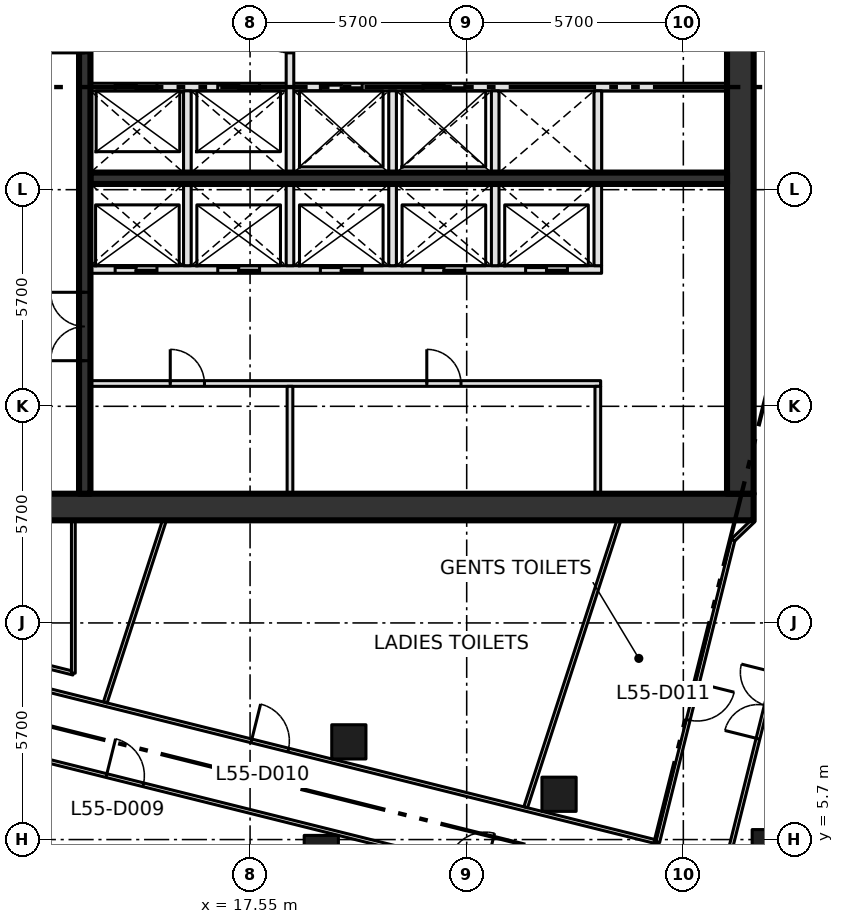
"""IFC4 building model, lengths in metres.
Left out: names, types, materials, properties, quantities, classifications, styles, units other than length and angle.
Written with IfcOpenShell. Run it as: python <this file> out.ifc"""

import sys

from ifc_helpers import new_model, si_unit, direction, frame, frame_2d, origin, origin_2d, place, context, subcontext, project, spatial, rectangle, extrude, element, fill, save


model = new_model("IFC4")
c1 = context("Model", 3, precision=1e-05, world=origin(), true_north=direction((0.0, 1.0)))
c2 = subcontext(c1, "Body", "Model", "MODEL_VIEW")
j1 = project(units=[si_unit("LENGTHUNIT", "METRE"), si_unit("PLANEANGLEUNIT", "RADIAN")], contexts=[c1])
p1 = place(None, origin())
s1 = spatial("IfcSite", under=j1, at=p1, CompositionType="ELEMENT")
p2 = place(p1, origin())
s2 = spatial("IfcBuilding", under=s1, at=p2, CompositionType="ELEMENT")
p3 = place(p2, frame((0.0, 0.0, 242.4)))
s3 = spatial("IfcBuildingStorey", under=s2, at=p3, CompositionType="ELEMENT", Elevation=242.4)
for number, where, z_axis, x_axis in (
    (1, (19.424, 5.36, 0.0), (0.0, 0.0, 1.0), (1.0, 0.0, 0.0)),
    (2, (20.149, 8.271, 0.0), (0.0, 0.0, 1.0), (1.0, 0.0, 0.0)),
    (3, (25.68, 6.892, 0.0), (0.0, 0.0, 1.0), (1.0, 0.0, 0.0)),
    (4, (31.211, 5.513, 0.0), (0.0, 0.0, 1.0), (1.0, 0.0, 0.0)),
):
    element("IfcColumn", number, at=place(p3, frame(where, z_axis=z_axis, x_axis=x_axis)), inside=s3, PredefinedType="COLUMN", context=c2, shape_type="SweptSolid", body=[
        extrude(rectangle(XDim=0.9, YDim=0.9, at=origin_2d()), origin(), (0.0, 0.0, 1.0), 4.2),
    ])
p4 = place(p3, frame((8.0, 14.45, -0.3), z_axis=(0.0, 0.0, 1.0), x_axis=(1.0, 0.0, 0.0)))
e5 = element("IfcWall", 5, at=p4, inside=s3, PredefinedType="SHEAR", context=c2, shape_type="SweptSolid", body=[
    extrude(rectangle(XDim=22.8, YDim=0.7, at=frame_2d((11.4, 0.0))), origin(), (0.0, 0.0, 1.0), 4.2),
])
p5 = place(p4, frame((2.3, 0.0, 0.3)))
e6 = element("IfcOpeningElement", 6, at=p5, cuts=e5, PredefinedType="OPENING", context=c2, shape_type="SweptSolid", body=[
    extrude(rectangle(XDim=1.8, YDim=2.1, at=frame_2d((0.9, 1.05))), frame((0.0, 0.36, 0.0), z_axis=(0.0, -1.0, 0.0), x_axis=(1.0, 0.0, 0.0)), (0.0, 0.0, 1.0), 0.72),
])
p6 = place(p3, frame((30.45, 14.8, -0.3), z_axis=(0.0, 0.0, 1.0), x_axis=(0.0, 1.0, 0.0)))
e7 = element("IfcWall", 7, at=p6, inside=s3, PredefinedType="SHEAR", context=c2, shape_type="SweptSolid", body=[
    extrude(rectangle(XDim=20.9, YDim=0.7, at=frame_2d((10.45, 0.0))), origin(), (0.0, 0.0, 1.0), 4.2),
])
p7 = place(p3, frame((13.35, 17.7, 0.0), z_axis=(0.0, 0.0, 1.0), x_axis=(1.0, 0.0, 0.0)))
e8 = element("IfcWall", 8, at=p7, inside=s3, PredefinedType="PARTITIONING", context=c2, shape_type="SweptSolid", body=[
    extrude(rectangle(XDim=13.425, YDim=0.15, at=frame_2d((6.712, 0.0))), origin(), (0.0, 0.0, 1.0), 3.9),
])
p8 = place(p7, frame((2.1, 0.0, 0.0)))
e9 = element("IfcOpeningElement", 9, at=p8, cuts=e8, PredefinedType="OPENING", context=c2, shape_type="SweptSolid", body=[
    extrude(rectangle(XDim=0.9, YDim=2.1, at=frame_2d((0.45, 1.05))), frame((0.0, 0.085, 0.0), z_axis=(0.0, -1.0, 0.0), x_axis=(1.0, 0.0, 0.0)), (0.0, 0.0, 1.0), 0.17),
])
p9 = place(p7, frame((8.85, 0.0, 0.0)))
e10 = element("IfcOpeningElement", 10, at=p9, cuts=e8, PredefinedType="OPENING", context=c2, shape_type="SweptSolid", body=[
    extrude(rectangle(XDim=0.9, YDim=2.1, at=frame_2d((0.45, 1.05))), frame((0.0, 0.085, 0.0), z_axis=(0.0, -1.0, 0.0), x_axis=(1.0, 0.0, 0.0)), (0.0, 0.0, 1.0), 0.17),
])
p10 = place(p3, frame((13.35, 20.7, 0.0), z_axis=(0.0, 0.0, 1.0), x_axis=(1.0, 0.0, 0.0)))
e11 = element("IfcWall", 11, at=p10, inside=s3, PredefinedType="SOLIDWALL", context=c2, shape_type="SweptSolid", body=[
    extrude(rectangle(XDim=13.45, YDim=0.2, at=frame_2d((6.725, 0.0))), origin(), (0.0, 0.0, 1.0), 3.9),
])
p11 = place(p10, frame((0.65, 0.0, 0.0)))
e12 = element("IfcOpeningElement", 12, at=p11, cuts=e11, PredefinedType="OPENING", context=c2, shape_type="SweptSolid", body=[
    extrude(rectangle(XDim=1.1, YDim=2.1, at=frame_2d((0.55, 1.05))), frame((0.0, 0.11, 0.0), z_axis=(0.0, -1.0, 0.0), x_axis=(1.0, 0.0, 0.0)), (0.0, 0.0, 1.0), 0.22),
])
p12 = place(p10, frame((3.35, 0.0, 0.0)))
e13 = element("IfcOpeningElement", 13, at=p12, cuts=e11, PredefinedType="OPENING", context=c2, shape_type="SweptSolid", body=[
    extrude(rectangle(XDim=1.1, YDim=2.1, at=frame_2d((0.55, 1.05))), frame((0.0, 0.11, 0.0), z_axis=(0.0, -1.0, 0.0), x_axis=(1.0, 0.0, 0.0)), (0.0, 0.0, 1.0), 0.22),
])
p13 = place(p10, frame((6.05, 0.0, 0.0)))
e14 = element("IfcOpeningElement", 14, at=p13, cuts=e11, PredefinedType="OPENING", context=c2, shape_type="SweptSolid", body=[
    extrude(rectangle(XDim=1.1, YDim=2.1, at=frame_2d((0.55, 1.05))), frame((0.0, 0.11, 0.0), z_axis=(0.0, -1.0, 0.0), x_axis=(1.0, 0.0, 0.0)), (0.0, 0.0, 1.0), 0.22),
])
p14 = place(p10, frame((8.75, 0.0, 0.0)))
e15 = element("IfcOpeningElement", 15, at=p14, cuts=e11, PredefinedType="OPENING", context=c2, shape_type="SweptSolid", body=[
    extrude(rectangle(XDim=1.1, YDim=2.1, at=frame_2d((0.55, 1.05))), frame((0.0, 0.11, 0.0), z_axis=(0.0, -1.0, 0.0), x_axis=(1.0, 0.0, 0.0)), (0.0, 0.0, 1.0), 0.22),
])
p15 = place(p10, frame((11.45, 0.0, 0.0)))
e16 = element("IfcOpeningElement", 16, at=p15, cuts=e11, PredefinedType="OPENING", context=c2, shape_type="SweptSolid", body=[
    extrude(rectangle(XDim=1.1, YDim=2.1, at=frame_2d((0.55, 1.05))), frame((0.0, 0.11, 0.0), z_axis=(0.0, -1.0, 0.0), x_axis=(1.0, 0.0, 0.0)), (0.0, 0.0, 1.0), 0.22),
])
p16 = place(p3, frame((13.35, 23.1, 0.0), z_axis=(0.0, 0.0, 1.0), x_axis=(1.0, 0.0, 0.0)))
e17 = element("IfcWall", 17, at=p16, inside=s3, PredefinedType="SHEAR", context=c2, shape_type="SweptSolid", body=[
    extrude(rectangle(XDim=16.75, YDim=0.3, at=frame_2d((8.375, 0.0))), origin(), (0.0, 0.0, 1.0), 3.9),
])
p17 = place(p3, frame((13.35, 25.5, 0.0), z_axis=(0.0, 0.0, 1.0), x_axis=(1.0, 0.0, 0.0)))
e18 = element("IfcWall", 18, at=p17, inside=s3, PredefinedType="SOLIDWALL", context=c2, shape_type="SweptSolid", body=[
    extrude(rectangle(XDim=16.75, YDim=0.2, at=frame_2d((8.375, 0.0))), origin(), (0.0, 0.0, 1.0), 3.9),
])
p18 = place(p17, frame((0.65, 0.0, 0.0)))
e19 = element("IfcOpeningElement", 19, at=p18, cuts=e18, PredefinedType="OPENING", context=c2, shape_type="SweptSolid", body=[
    extrude(rectangle(XDim=1.1, YDim=2.1, at=frame_2d((0.55, 1.05))), frame((0.0, 0.11, 0.0), z_axis=(0.0, -1.0, 0.0), x_axis=(1.0, 0.0, 0.0)), (0.0, 0.0, 1.0), 0.22),
])
p19 = place(p17, frame((3.35, 0.0, 0.0)))
e20 = element("IfcOpeningElement", 20, at=p19, cuts=e18, PredefinedType="OPENING", context=c2, shape_type="SweptSolid", body=[
    extrude(rectangle(XDim=1.1, YDim=2.1, at=frame_2d((0.55, 1.05))), frame((0.0, 0.11, 0.0), z_axis=(0.0, -1.0, 0.0), x_axis=(1.0, 0.0, 0.0)), (0.0, 0.0, 1.0), 0.22),
])
p20 = place(p17, frame((6.05, 0.0, 0.0)))
e21 = element("IfcOpeningElement", 21, at=p20, cuts=e18, PredefinedType="OPENING", context=c2, shape_type="SweptSolid", body=[
    extrude(rectangle(XDim=1.1, YDim=2.1, at=frame_2d((0.55, 1.05))), frame((0.0, 0.11, 0.0), z_axis=(0.0, -1.0, 0.0), x_axis=(1.0, 0.0, 0.0)), (0.0, 0.0, 1.0), 0.22),
])
p21 = place(p17, frame((8.75, 0.0, 0.0)))
e22 = element("IfcOpeningElement", 22, at=p21, cuts=e18, PredefinedType="OPENING", context=c2, shape_type="SweptSolid", body=[
    extrude(rectangle(XDim=1.1, YDim=2.1, at=frame_2d((0.55, 1.05))), frame((0.0, 0.11, 0.0), z_axis=(0.0, -1.0, 0.0), x_axis=(1.0, 0.0, 0.0)), (0.0, 0.0, 1.0), 0.22),
])
p22 = place(p3, frame((13.2, 14.8, 0.0), z_axis=(0.0, 0.0, 1.0), x_axis=(0.0, 1.0, 0.0)))
e23 = element("IfcWall", 23, at=p22, inside=s3, PredefinedType="SHEAR", context=c2, shape_type="SweptSolid", body=[
    extrude(rectangle(XDim=20.9, YDim=0.3, at=frame_2d((10.45, 0.0))), origin(), (0.0, 0.0, 1.0), 3.9),
])
p23 = place(p22, frame((3.5, 0.0, 0.0)))
e24 = element("IfcOpeningElement", 24, at=p23, cuts=e23, PredefinedType="OPENING", context=c2, shape_type="SweptSolid", body=[
    extrude(rectangle(XDim=1.8, YDim=2.1, at=frame_2d((0.9, 1.05))), frame((0.0, 0.16, 0.0), z_axis=(0.0, -1.0, 0.0), x_axis=(1.0, 0.0, 0.0)), (0.0, 0.0, 1.0), 0.32),
])
p24 = place(p22, frame((11.6, 0.0, 0.0)))
e25 = element("IfcOpeningElement", 25, at=p24, cuts=e23, PredefinedType="OPENING", context=c2, shape_type="SweptSolid", body=[
    extrude(rectangle(XDim=1.2, YDim=2.1, at=frame_2d((0.6, 1.05))), frame((0.0, 0.16, 0.0), z_axis=(0.0, -1.0, 0.0), x_axis=(1.0, 0.0, 0.0)), (0.0, 0.0, 1.0), 0.32),
])
p25 = place(p3, frame((15.9, 20.8, 0.0), z_axis=(0.0, 0.0, 1.0), x_axis=(0.0, 1.0, 0.0)))
e26 = element("IfcWall", 26, at=p25, inside=s3, PredefinedType="SOLIDWALL", context=c2, shape_type="SweptSolid", body=[
    extrude(rectangle(XDim=4.6, YDim=0.2, at=frame_2d((2.3, 0.0))), origin(), (0.0, 0.0, 1.0), 3.9),
])
p26 = place(p3, frame((18.6, 14.8, 0.0), z_axis=(0.0, 0.0, 1.0), x_axis=(0.0, 1.0, 0.0)))
e27 = element("IfcWall", 27, at=p26, inside=s3, PredefinedType="PARTITIONING", context=c2, shape_type="SweptSolid", body=[
    extrude(rectangle(XDim=2.825, YDim=0.15, at=frame_2d((1.413, 0.0))), origin(), (0.0, 0.0, 1.0), 3.9),
])
p27 = place(p3, frame((18.6, 20.8, 0.0), z_axis=(0.0, 0.0, 1.0), x_axis=(0.0, 1.0, 0.0)))
e28 = element("IfcWall", 28, at=p27, inside=s3, PredefinedType="SOLIDWALL", context=c2, shape_type="SweptSolid", body=[
    extrude(rectangle(XDim=7.6, YDim=0.2, at=frame_2d((3.8, 0.0))), origin(), (0.0, 0.0, 1.0), 3.9),
])
p28 = place(p27, frame((5.6, 0.0, 0.0)))
e29 = element("IfcOpeningElement", 29, at=p28, cuts=e28, PredefinedType="OPENING", context=c2, shape_type="SweptSolid", body=[
    extrude(rectangle(XDim=1.2, YDim=2.1, at=frame_2d((0.6, 1.05))), frame((0.0, 0.11, 0.0), z_axis=(0.0, -1.0, 0.0), x_axis=(1.0, 0.0, 0.0)), (0.0, 0.0, 1.0), 0.22),
])
for number, where, z_axis, x_axis in (
    (30, (21.3, 20.8, 0.0), (0.0, 0.0, 1.0), (0.0, 1.0, 0.0)),
    (31, (24.0, 20.8, 0.0), (0.0, 0.0, 1.0), (0.0, 1.0, 0.0)),
):
    element("IfcWall", number, at=place(p3, frame(where, z_axis=z_axis, x_axis=x_axis)), inside=s3, PredefinedType="SOLIDWALL", context=c2, shape_type="SweptSolid", body=[
        extrude(rectangle(XDim=4.6, YDim=0.2, at=frame_2d((2.3, 0.0))), origin(), (0.0, 0.0, 1.0), 3.9),
    ])
p29 = place(p3, frame((26.7, 14.8, 0.0), z_axis=(0.0, 0.0, 1.0), x_axis=(0.0, 1.0, 0.0)))
e32 = element("IfcWall", 32, at=p29, inside=s3, PredefinedType="PARTITIONING", context=c2, shape_type="SweptSolid", body=[
    extrude(rectangle(XDim=2.825, YDim=0.15, at=frame_2d((1.413, 0.0))), origin(), (0.0, 0.0, 1.0), 3.9),
])
p30 = place(p3, frame((26.7, 20.8, 0.0), z_axis=(0.0, 0.0, 1.0), x_axis=(0.0, 1.0, 0.0)))
e33 = element("IfcWall", 33, at=p30, inside=s3, PredefinedType="SOLIDWALL", context=c2, shape_type="SweptSolid", body=[
    extrude(rectangle(XDim=4.6, YDim=0.2, at=frame_2d((2.3, 0.0))), origin(), (0.0, 0.0, 1.0), 3.9),
])
p31 = place(p3, frame((8.55, 8.685, 0.0), z_axis=(0.0, 0.0, 1.0), x_axis=(0.970297603286, -0.241914367199, 0.0)))
e34 = element("IfcWall", 34, at=p31, inside=s3, PredefinedType="PARTITIONING", context=c2, shape_type="SweptSolid", body=[
    extrude(rectangle(XDim=50.675, YDim=0.1, at=frame_2d((25.337, 0.0))), origin(), (0.0, 0.0, 1.0), 3.9),
])
p32 = place(p31, frame((35.657, 0.0, 0.0)))
e35 = element("IfcOpeningElement", 35, at=p32, cuts=e34, PredefinedType="OPENING", context=c2, shape_type="SweptSolid", body=[
    extrude(rectangle(XDim=1.8, YDim=2.1, at=frame_2d((0.9, 1.05))), frame((0.0, 0.06, 0.0), z_axis=(0.0, -1.0, 0.0), x_axis=(1.0, 0.0, 0.0)), (0.0, 0.0, 1.0), 0.12),
])
p33 = place(p31, frame((14.657, 0.0, 0.0)))
e36 = element("IfcOpeningElement", 36, at=p33, cuts=e34, PredefinedType="OPENING", context=c2, shape_type="SweptSolid", body=[
    extrude(rectangle(XDim=1.0, YDim=2.1, at=frame_2d((0.5, 1.05))), frame((0.0, 0.06, 0.0), z_axis=(0.0, -1.0, 0.0), x_axis=(1.0, 0.0, 0.0)), (0.0, 0.0, 1.0), 0.12),
])
p34 = place(p31, frame((19.357, 0.0, 0.0)))
e37 = element("IfcOpeningElement", 37, at=p34, cuts=e34, PredefinedType="OPENING", context=c2, shape_type="SweptSolid", body=[
    extrude(rectangle(XDim=1.8, YDim=2.1, at=frame_2d((0.9, 1.05))), frame((0.0, 0.06, 0.0), z_axis=(0.0, -1.0, 0.0), x_axis=(1.0, 0.0, 0.0)), (0.0, 0.0, 1.0), 0.12),
])
p35 = place(p31, frame((5.38, 0.0, 0.0)))
e38 = element("IfcOpeningElement", 38, at=p35, cuts=e34, PredefinedType="OPENING", context=c2, shape_type="SweptSolid", body=[
    extrude(rectangle(XDim=1.0, YDim=2.1, at=frame_2d((0.5, 1.05))), frame((0.0, 0.06, 0.0), z_axis=(0.0, -1.0, 0.0), x_axis=(1.0, 0.0, 0.0)), (0.0, 0.0, 1.0), 0.12),
])
p36 = place(p3, frame((8.988, 10.44, 0.0), z_axis=(0.0, 0.0, 1.0), x_axis=(0.970301223092, -0.241899848006, 0.0)))
e39 = element("IfcWall", 39, at=p36, inside=s3, PredefinedType="PARTITIONING", context=c2, shape_type="SweptSolid", body=[
    extrude(rectangle(XDim=19.879, YDim=0.1, at=frame_2d((9.94, 0.0))), origin(), (0.0, 0.0, 1.0), 3.9),
])
p37 = place(p36, frame((8.861, 0.0, 0.0)))
e40 = element("IfcOpeningElement", 40, at=p37, cuts=e39, PredefinedType="OPENING", context=c2, shape_type="SweptSolid", body=[
    extrude(rectangle(XDim=1.0, YDim=2.1, at=frame_2d((0.5, 1.05))), frame((0.0, 0.06, 0.0), z_axis=(0.0, -1.0, 0.0), x_axis=(1.0, 0.0, 0.0)), (0.0, 0.0, 1.0), 0.12),
])
p38 = place(p3, frame((9.9, 10.826, 0.0), z_axis=(0.0, 0.0, 1.0), x_axis=(0.970290953223, -0.241941038466, 0.0)))
e41 = element("IfcWall", 41, at=p38, inside=s3, PredefinedType="PARTITIONING", context=c2, shape_type="SweptSolid", body=[
    extrude(rectangle(XDim=3.092, YDim=0.1, at=frame_2d((1.546, 0.0))), origin(), (0.0, 0.0, 1.0), 3.9),
])
p39 = place(p3, frame((12.9, 10.078, 0.0), z_axis=(0.0, 0.0, 1.0), x_axis=(0.0, 1.0, 0.0)))
e42 = element("IfcWall", 42, at=p39, inside=s3, PredefinedType="PARTITIONING", context=c2, shape_type="SweptSolid", body=[
    extrude(rectangle(XDim=4.022, YDim=0.1, at=frame_2d((2.011, 0.0))), origin(), (0.0, 0.0, 1.0), 3.9),
])
p40 = place(p3, frame((30.12, 5.171, 0.0), z_axis=(0.0, 0.0, 1.0), x_axis=(0.241902913229, 0.970300458915, 0.0)))
e43 = element("IfcWall", 43, at=p40, inside=s3, PredefinedType="PARTITIONING", context=c2, shape_type="SweptSolid", body=[
    extrude(rectangle(XDim=8.172, YDim=0.1, at=frame_2d((4.086, 0.0))), origin(), (0.0, 0.0, 1.0), 3.9),
])
p41 = place(p40, frame((3.28, 0.0, 0.0)))
e44 = element("IfcOpeningElement", 44, at=p41, cuts=e43, PredefinedType="OPENING", context=c2, shape_type="SweptSolid", body=[
    extrude(rectangle(XDim=1.8, YDim=2.1, at=frame_2d((0.9, 1.05))), frame((0.0, 0.06, 0.0), z_axis=(0.0, -1.0, 0.0), x_axis=(1.0, 0.0, 0.0)), (0.0, 0.0, 1.0), 0.12),
])
p42 = place(p3, frame((30.259, 13.583, 0.0), z_axis=(0.0, 0.0, 1.0), x_axis=(-0.241841612879, -0.970315739479, 0.0)))
e45 = element("IfcWall", 45, at=p42, inside=s3, PredefinedType="PARTITIONING", context=c2, shape_type="SweptSolid", body=[
    extrude(rectangle(XDim=8.195, YDim=0.1, at=frame_2d((4.098, 0.0))), origin(), (0.0, 0.0, 1.0), 3.9),
])
p43 = place(p42, frame((3.88, 0.0, 0.0)))
e46 = element("IfcOpeningElement", 46, at=p43, cuts=e45, PredefinedType="OPENING", context=c2, shape_type="SweptSolid", body=[
    extrude(rectangle(XDim=1.0, YDim=2.1, at=frame_2d((0.5, 1.05))), frame((0.0, 0.06, 0.0), z_axis=(0.0, -1.0, 0.0), x_axis=(1.0, 0.0, 0.0)), (0.0, 0.0, 1.0), 0.12),
])
p44 = place(p3, frame((30.8, 14.1, 0.0), z_axis=(0.0, 0.0, 1.0), x_axis=(-0.722911025189, -0.690941133281, 0.0)))
e47 = element("IfcWall", 47, at=p44, inside=s3, PredefinedType="PARTITIONING", context=c2, shape_type="SweptSolid", body=[
    extrude(rectangle(XDim=0.748, YDim=0.1, at=frame_2d((0.374, 0.0))), origin(), (0.0, 0.0, 1.0), 3.9),
])
p45 = place(p3, frame((13.741, 9.31, 0.0), z_axis=(0.0, 0.0, 1.0), x_axis=(0.308976461467, 0.95106968528, 0.0)))
e48 = element("IfcWall", 48, at=p45, inside=s3, PredefinedType="PARTITIONING", context=c2, shape_type="SweptSolid", body=[
    extrude(rectangle(XDim=5.036, YDim=0.1, at=frame_2d((2.518, 0.0))), origin(), (0.0, 0.0, 1.0), 3.9),
])
p46 = place(p3, frame((24.803, 6.552, 0.0), z_axis=(0.0, 0.0, 1.0), x_axis=(0.308946255954, 0.951079497693, 0.0)))
e49 = element("IfcWall", 49, at=p46, inside=s3, PredefinedType="PARTITIONING", context=c2, shape_type="SweptSolid", body=[
    extrude(rectangle(XDim=7.936, YDim=0.1, at=frame_2d((3.968, 0.0))), origin(), (0.0, 0.0, 1.0), 3.9),
])
p47 = place(p11, origin())
e50 = element("IfcDoor", 50, at=p47, inside=s3, OperationType="SLIDING_TO_LEFT", PredefinedType="DOOR", context=c2, shape_type="SweptSolid", body=[
    extrude(rectangle(XDim=1.1, YDim=2.1, at=frame_2d((0.55, 1.05))), frame((0.0, 0.025, 0.0), z_axis=(0.0, -1.0, 0.0), x_axis=(1.0, 0.0, 0.0)), (0.0, 0.0, 1.0), 0.05),
])
fill(e12, e50)
p48 = place(p12, origin())
e51 = element("IfcDoor", 51, at=p48, inside=s3, OperationType="SLIDING_TO_LEFT", PredefinedType="DOOR", context=c2, shape_type="SweptSolid", body=[
    extrude(rectangle(XDim=1.1, YDim=2.1, at=frame_2d((0.55, 1.05))), frame((0.0, 0.025, 0.0), z_axis=(0.0, -1.0, 0.0), x_axis=(1.0, 0.0, 0.0)), (0.0, 0.0, 1.0), 0.05),
])
fill(e13, e51)
p49 = place(p13, origin())
e52 = element("IfcDoor", 52, at=p49, inside=s3, OperationType="SLIDING_TO_LEFT", PredefinedType="DOOR", context=c2, shape_type="SweptSolid", body=[
    extrude(rectangle(XDim=1.1, YDim=2.1, at=frame_2d((0.55, 1.05))), frame((0.0, 0.025, 0.0), z_axis=(0.0, -1.0, 0.0), x_axis=(1.0, 0.0, 0.0)), (0.0, 0.0, 1.0), 0.05),
])
fill(e14, e52)
p50 = place(p14, origin())
e53 = element("IfcDoor", 53, at=p50, inside=s3, OperationType="SLIDING_TO_LEFT", PredefinedType="DOOR", context=c2, shape_type="SweptSolid", body=[
    extrude(rectangle(XDim=1.1, YDim=2.1, at=frame_2d((0.55, 1.05))), frame((0.0, 0.025, 0.0), z_axis=(0.0, -1.0, 0.0), x_axis=(1.0, 0.0, 0.0)), (0.0, 0.0, 1.0), 0.05),
])
fill(e15, e53)
p51 = place(p15, origin())
e54 = element("IfcDoor", 54, at=p51, inside=s3, OperationType="SLIDING_TO_LEFT", PredefinedType="DOOR", context=c2, shape_type="SweptSolid", body=[
    extrude(rectangle(XDim=1.1, YDim=2.1, at=frame_2d((0.55, 1.05))), frame((0.0, 0.025, 0.0), z_axis=(0.0, -1.0, 0.0), x_axis=(1.0, 0.0, 0.0)), (0.0, 0.0, 1.0), 0.05),
])
fill(e16, e54)
p52 = place(p18, origin())
e55 = element("IfcDoor", 55, at=p52, inside=s3, OperationType="SLIDING_TO_LEFT", PredefinedType="DOOR", context=c2, shape_type="SweptSolid", body=[
    extrude(rectangle(XDim=1.1, YDim=2.1, at=frame_2d((0.55, 1.05))), frame((0.0, 0.025, 0.0), z_axis=(0.0, -1.0, 0.0), x_axis=(1.0, 0.0, 0.0)), (0.0, 0.0, 1.0), 0.05),
])
fill(e19, e55)
p53 = place(p19, origin())
e56 = element("IfcDoor", 56, at=p53, inside=s3, OperationType="SLIDING_TO_LEFT", PredefinedType="DOOR", context=c2, shape_type="SweptSolid", body=[
    extrude(rectangle(XDim=1.1, YDim=2.1, at=frame_2d((0.55, 1.05))), frame((0.0, 0.025, 0.0), z_axis=(0.0, -1.0, 0.0), x_axis=(1.0, 0.0, 0.0)), (0.0, 0.0, 1.0), 0.05),
])
fill(e20, e56)
p54 = place(p20, origin())
e57 = element("IfcDoor", 57, at=p54, inside=s3, OperationType="SLIDING_TO_LEFT", PredefinedType="DOOR", context=c2, shape_type="SweptSolid", body=[
    extrude(rectangle(XDim=1.1, YDim=2.1, at=frame_2d((0.55, 1.05))), frame((0.0, 0.025, 0.0), z_axis=(0.0, -1.0, 0.0), x_axis=(1.0, 0.0, 0.0)), (0.0, 0.0, 1.0), 0.05),
])
fill(e21, e57)
p55 = place(p21, origin())
e58 = element("IfcDoor", 58, at=p55, inside=s3, OperationType="SLIDING_TO_LEFT", PredefinedType="DOOR", context=c2, shape_type="SweptSolid", body=[
    extrude(rectangle(XDim=1.1, YDim=2.1, at=frame_2d((0.55, 1.05))), frame((0.0, 0.025, 0.0), z_axis=(0.0, -1.0, 0.0), x_axis=(1.0, 0.0, 0.0)), (0.0, 0.0, 1.0), 0.05),
])
fill(e22, e58)
p56 = place(p8, origin())
e59 = element("IfcDoor", 59, at=p56, inside=s3, OperationType="SINGLE_SWING_LEFT", PredefinedType="DOOR", context=c2, shape_type="SweptSolid", body=[
    extrude(rectangle(XDim=0.9, YDim=2.1, at=frame_2d((0.45, 1.05))), frame((0.0, 0.025, 0.0), z_axis=(0.0, -1.0, 0.0), x_axis=(1.0, 0.0, 0.0)), (0.0, 0.0, 1.0), 0.05),
])
fill(e9, e59)
p57 = place(p9, origin())
e60 = element("IfcDoor", 60, at=p57, inside=s3, OperationType="SINGLE_SWING_LEFT", PredefinedType="DOOR", context=c2, shape_type="SweptSolid", body=[
    extrude(rectangle(XDim=0.9, YDim=2.1, at=frame_2d((0.45, 1.05))), frame((0.0, 0.025, 0.0), z_axis=(0.0, -1.0, 0.0), x_axis=(1.0, 0.0, 0.0)), (0.0, 0.0, 1.0), 0.05),
])
fill(e10, e60)
p58 = place(p23, origin())
e61 = element("IfcDoor", 61, at=p58, inside=s3, OperationType="DOUBLE_DOOR_SINGLE_SWING", PredefinedType="DOOR", context=c2, shape_type="SweptSolid", body=[
    extrude(rectangle(XDim=1.8, YDim=2.1, at=frame_2d((0.9, 1.05))), frame((0.0, 0.025, 0.0), z_axis=(0.0, -1.0, 0.0), x_axis=(1.0, 0.0, 0.0)), (0.0, 0.0, 1.0), 0.05),
])
fill(e24, e61)
p59 = place(p35, origin())
e62 = element("IfcDoor", 62, at=p59, inside=s3, OperationType="SINGLE_SWING_LEFT", PredefinedType="DOOR", context=c2, shape_type="SweptSolid", body=[
    extrude(rectangle(XDim=1.0, YDim=2.1, at=frame_2d((0.5, 1.05))), frame((0.0, 0.025, 0.0), z_axis=(0.0, -1.0, 0.0), x_axis=(1.0, 0.0, 0.0)), (0.0, 0.0, 1.0), 0.05),
])
fill(e38, e62)
p60 = place(p37, origin())
e63 = element("IfcDoor", 63, at=p60, inside=s3, OperationType="SINGLE_SWING_LEFT", PredefinedType="DOOR", context=c2, shape_type="SweptSolid", body=[
    extrude(rectangle(XDim=1.0, YDim=2.1, at=frame_2d((0.5, 1.05))), frame((0.0, 0.025, 0.0), z_axis=(0.0, -1.0, 0.0), x_axis=(1.0, 0.0, 0.0)), (0.0, 0.0, 1.0), 0.05),
])
fill(e40, e63)
p61 = place(p43, origin())
e64 = element("IfcDoor", 64, at=p61, inside=s3, OperationType="SINGLE_SWING_LEFT", PredefinedType="DOOR", context=c2, shape_type="SweptSolid", body=[
    extrude(rectangle(XDim=1.0, YDim=2.1, at=frame_2d((0.5, 1.05))), frame((0.0, 0.025, 0.0), z_axis=(0.0, -1.0, 0.0), x_axis=(1.0, 0.0, 0.0)), (0.0, 0.0, 1.0), 0.05),
])
fill(e46, e64)
p62 = place(p41, origin())
e65 = element("IfcDoor", 65, at=p62, inside=s3, OperationType="DOUBLE_DOOR_SINGLE_SWING", PredefinedType="DOOR", context=c2, shape_type="SweptSolid", body=[
    extrude(rectangle(XDim=1.8, YDim=2.1, at=frame_2d((0.9, 1.05))), frame((0.0, 0.025, 0.0), z_axis=(0.0, -1.0, 0.0), x_axis=(1.0, 0.0, 0.0)), (0.0, 0.0, 1.0), 0.05),
])
fill(e44, e65)
save(model, sys.argv[1])
